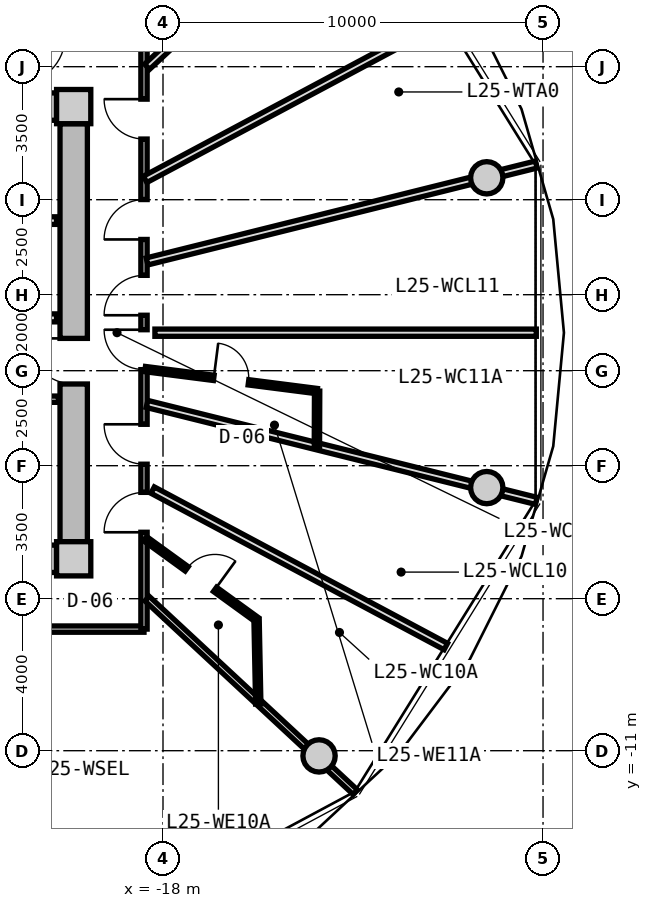
"""IFC4 building model, lengths in metres.
Left out: names, types, materials, properties, quantities, classifications, styles, units other than length and angle.
Written with IfcOpenShell. Run it as: python <this file> out.ifc"""

import sys

from ifc_helpers import new_model, si_unit, direction, frame, frame_2d, origin, origin_2d, place, context, subcontext, project, spatial, rectangle, circle, extrude, source, transform, mapped, element, fill, save


model = new_model("IFC4")
c1 = context("Model", 3, precision=1e-05, world=origin(), true_north=direction((0.0, 1.0)))
c2 = subcontext(c1, "Body", "Model", "MODEL_VIEW")
j1 = project(units=[si_unit("LENGTHUNIT", "METRE"), si_unit("PLANEANGLEUNIT", "RADIAN")], contexts=[c1])
p1 = place(None, origin())
s1 = spatial("IfcSite", under=j1, at=p1, CompositionType="ELEMENT")
p2 = place(p1, origin())
s2 = spatial("IfcBuilding", under=s1, at=p2, CompositionType="ELEMENT")
p3 = place(p2, frame((0.0, 0.0, 84.05)))
s3 = spatial("IfcBuildingStorey", under=s2, at=p3, CompositionType="ELEMENT", Elevation=84.05)
m1 = source(origin(), c2, "Body", "SweptSolid", [
    extrude(rectangle(XDim=0.9, YDim=0.9, at=origin_2d()), origin(), (0.0, 0.0, 1.0), 3.05),
])
for number, where, z_axis, x_axis in (
    (1, (-20.35, -5.95, 0.0), (0.0, 0.0, 1.0), (1.0, 0.0, 0.0)),
    (2, (-20.35, 5.95, 0.0), (0.0, 0.0, 1.0), (1.0, 0.0, 0.0)),
):
    element("IfcColumn", number, at=place(p3, frame(where, z_axis=z_axis, x_axis=x_axis)), inside=s3, PredefinedType="COLUMN", context=c2, shape_type="MappedRepresentation", body=[
        mapped(m1, transform((0.0, 0.0, 0.0), x_axis=(1.0, 0.0, 0.0), y_axis=(0.0, 1.0, 0.0), z_axis=(0.0, 0.0, 1.0), scale=1.0)),
    ])
m2 = source(origin(), c2, "Body", "SweptSolid", [
    extrude(rectangle(XDim=14.4, YDim=0.72, at=frame_2d((7.2, 0.0))), origin(), (0.0, 0.0, 1.0), 2.79),
])
for number, where, z_axis, x_axis in (
    (3, (-35.2, 5.95, 0.0), (0.0, 0.0, 1.0), (1.0, 0.0, 0.0)),
    (4, (-20.8, -5.95, 0.0), (0.0, 0.0, 1.0), (-1.0, 0.0, 0.0)),
):
    element("IfcWall", number, at=place(p3, frame(where, z_axis=z_axis, x_axis=x_axis)), inside=s3, PredefinedType="SHEAR", context=c2, shape_type="MappedRepresentation", body=[
        mapped(m2, transform((0.0, 0.0, 0.0), x_axis=(1.0, 0.0, 0.0), y_axis=(0.0, 1.0, 0.0), z_axis=(0.0, 0.0, 1.0), scale=1.0)),
    ])
m3 = source(origin(), c2, "Body", "SweptSolid", [
    extrude(rectangle(XDim=11.0, YDim=0.72, at=frame_2d((5.5, 0.0))), origin(), (0.0, 0.0, 1.0), 2.79),
])
p4 = place(p3, frame((-20.35, 5.5, 0.0), z_axis=(0.0, 0.0, 1.0), x_axis=(0.0, -1.0, 0.0)))
e5 = element("IfcWall", 5, at=p4, inside=s3, PredefinedType="SHEAR", context=c2, shape_type="MappedRepresentation", body=[
    mapped(m3, transform((0.0, 0.0, 0.0), x_axis=(1.0, 0.0, 0.0), y_axis=(0.0, 1.0, 0.0), z_axis=(0.0, 0.0, 1.0), scale=1.0)),
])
p5 = place(p4, frame((5.65, 0.0, 0.0)))
e6 = element("IfcOpeningElement", 6, at=p5, cuts=e5, PredefinedType="OPENING", context=c2, shape_type="SweptSolid", body=[
    extrude(rectangle(XDim=1.2, YDim=2.15, at=frame_2d((0.6, 1.075))), frame((0.0, 0.37, 0.0), z_axis=(0.0, -1.0, 0.0), x_axis=(1.0, 0.0, 0.0)), (0.0, 0.0, 1.0), 0.74),
])
m4 = source(origin(), c2, "Body", "SweptSolid", [
    extrude(circle(Radius=0.425, at=origin_2d()), origin(), (0.0, 0.0, 1.0), 3.05),
])
for number, where, z_axis, x_axis in (
    (7, (-9.481, 4.076, 0.0), (0.0, 0.0, 1.0), (1.0, 0.0, 0.0)),
    (8, (-13.894, -11.137, 0.0), (0.0, 0.0, 1.0), (1.0, 0.0, 0.0)),
    (9, (-9.481, -4.076, 0.0), (0.0, 0.0, 1.0), (1.0, 0.0, 0.0)),
):
    element("IfcColumn", number, at=place(p3, frame(where, z_axis=z_axis, x_axis=x_axis)), inside=s3, PredefinedType="COLUMN", context=c2, shape_type="MappedRepresentation", body=[
        mapped(m4, transform((0.0, 0.0, 0.0), x_axis=(1.0, 0.0, 0.0), y_axis=(0.0, 1.0, 0.0), z_axis=(0.0, 0.0, 1.0), scale=1.0)),
    ])
m5 = source(origin(), c2, "Body", "SweptSolid", [
    extrude(rectangle(XDim=3.2, YDim=0.2, at=frame_2d((1.6, 0.0))), origin(), (0.0, 0.0, 1.0), 2.775),
])
p6 = place(p3, frame((-24.0, 2.95, 0.0), z_axis=(0.0, 0.0, 1.0), x_axis=(1.0, 0.0, 0.0)))
e10 = element("IfcWall", 10, at=p6, inside=s3, PredefinedType="PARTITIONING", context=c2, shape_type="MappedRepresentation", body=[
    mapped(m5, transform((0.0, 0.0, 0.0), x_axis=(1.0, 0.0, 0.0), y_axis=(0.0, 1.0, 0.0), z_axis=(0.0, 0.0, 1.0), scale=1.0)),
])
m6 = source(origin(), c2, "Body", "SweptSolid", [
    extrude(rectangle(XDim=6.66, YDim=0.21, at=frame_2d((3.33, 0.0))), origin(), (0.0, 0.0, 1.0), 2.775),
])
p7 = place(p3, frame((-27.46, 0.39, 0.0), z_axis=(0.0, 0.0, 1.0), x_axis=(1.0, 0.0, 0.0)))
e11 = element("IfcWall", 11, at=p7, inside=s3, PredefinedType="PARTITIONING", context=c2, shape_type="MappedRepresentation", body=[
    mapped(m6, transform((0.0, 0.0, 0.0), x_axis=(1.0, 0.0, 0.0), y_axis=(0.0, 1.0, 0.0), z_axis=(0.0, 0.0, 1.0), scale=1.0)),
])
p8 = place(p7, frame((1.0, 0.0, 0.0)))
e12 = element("IfcOpeningElement", 12, at=p8, cuts=e11, PredefinedType="OPENING", context=c2, shape_type="SweptSolid", body=[
    extrude(rectangle(XDim=1.2, YDim=2.15, at=frame_2d((0.6, 1.075))), frame((0.0, 0.115, 0.0), z_axis=(0.0, -1.0, 0.0), x_axis=(1.0, 0.0, 0.0)), (0.0, 0.0, 1.0), 0.23),
])
m7 = source(origin(), c2, "Body", "SweptSolid", [
    extrude(rectangle(XDim=2.7, YDim=0.165, at=frame_2d((1.35, 0.0))), origin(), (0.0, 0.0, 1.0), 2.775),
])
p9 = place(p3, frame((-23.45, -1.75, 0.0), z_axis=(0.0, 0.0, 1.0), x_axis=(1.0, 0.0, 0.0)))
e13 = element("IfcWall", 13, at=p9, inside=s3, PredefinedType="PARTITIONING", context=c2, shape_type="MappedRepresentation", body=[
    mapped(m7, transform((0.0, 0.0, 0.0), x_axis=(1.0, 0.0, 0.0), y_axis=(0.0, 1.0, 0.0), z_axis=(0.0, 0.0, 1.0), scale=1.0)),
])
p10 = place(p9, frame((0.85, 0.0, 0.0)))
e14 = element("IfcOpeningElement", 14, at=p10, cuts=e13, PredefinedType="OPENING", context=c2, shape_type="SweptSolid", body=[
    extrude(rectangle(XDim=0.925, YDim=2.1, at=frame_2d((0.462, 1.05))), frame((0.0, 0.093, 0.0), z_axis=(0.0, -1.0, 0.0), x_axis=(1.0, 0.0, 0.0)), (0.0, 0.0, 1.0), 0.185),
])
m8 = source(origin(), c2, "Body", "SweptSolid", [
    extrude(rectangle(XDim=8.6, YDim=0.165, at=frame_2d((4.3, 0.0))), origin(), (0.0, 0.0, 1.0), 2.775),
])
p11 = place(p3, frame((-18.5, -7.8, 0.0), z_axis=(0.0, 0.0, 1.0), x_axis=(-1.0, 0.0, 0.0)))
e15 = element("IfcWall", 15, at=p11, inside=s3, PredefinedType="PARTITIONING", context=c2, shape_type="MappedRepresentation", body=[
    mapped(m8, transform((0.0, 0.0, 0.0), x_axis=(1.0, 0.0, 0.0), y_axis=(0.0, 1.0, 0.0), z_axis=(0.0, 0.0, 1.0), scale=1.0)),
])
p12 = place(p11, frame((3.775, 0.0, 0.0)))
e16 = element("IfcOpeningElement", 16, at=p12, cuts=e15, PredefinedType="OPENING", context=c2, shape_type="SweptSolid", body=[
    extrude(rectangle(XDim=1.05, YDim=2.15, at=frame_2d((0.525, 1.075))), frame((0.0, 0.093, 0.0), z_axis=(0.0, -1.0, 0.0), x_axis=(1.0, 0.0, 0.0)), (0.0, 0.0, 1.0), 0.185),
])
m9 = source(origin(), c2, "Body", "SweptSolid", [
    extrude(rectangle(XDim=15.6, YDim=0.165, at=frame_2d((7.8, 0.0))), origin(), (0.0, 0.0, 1.0), 2.775),
])
p13 = place(p3, frame((-18.5, 7.8, 0.0), z_axis=(0.0, 0.0, 1.0), x_axis=(0.0, -1.0, 0.0)))
e17 = element("IfcWall", 17, at=p13, inside=s3, PredefinedType="PARTITIONING", context=c2, shape_type="MappedRepresentation", body=[
    mapped(m9, transform((0.0, 0.0, 0.0), x_axis=(1.0, 0.0, 0.0), y_axis=(0.0, 1.0, 0.0), z_axis=(0.0, 0.0, 1.0), scale=1.0)),
])
p14 = place(p13, frame((12.002, 0.0, 0.0)))
e18 = element("IfcOpeningElement", 18, at=p14, cuts=e17, PredefinedType="OPENING", context=c2, shape_type="SweptSolid", body=[
    extrude(rectangle(XDim=1.05, YDim=2.15, at=frame_2d((0.525, 1.075))), frame((0.0, 0.093, 0.0), z_axis=(0.0, -1.0, 0.0), x_axis=(1.0, 0.0, 0.0)), (0.0, 0.0, 1.0), 0.185),
])
p15 = place(p13, frame((10.211, 0.0, 0.0)))
e19 = element("IfcOpeningElement", 19, at=p15, cuts=e17, PredefinedType="OPENING", context=c2, shape_type="SweptSolid", body=[
    extrude(rectangle(XDim=1.05, YDim=2.15, at=frame_2d((0.525, 1.075))), frame((0.0, 0.093, 0.0), z_axis=(0.0, -1.0, 0.0), x_axis=(1.0, 0.0, 0.0)), (0.0, 0.0, 1.0), 0.185),
])
p16 = place(p13, frame((7.722, 0.0, 0.0)))
e20 = element("IfcOpeningElement", 20, at=p16, cuts=e17, PredefinedType="OPENING", context=c2, shape_type="SweptSolid", body=[
    extrude(rectangle(XDim=1.05, YDim=2.15, at=frame_2d((0.525, 1.075))), frame((0.0, 0.093, 0.0), z_axis=(0.0, -1.0, 0.0), x_axis=(1.0, 0.0, 0.0)), (0.0, 0.0, 1.0), 0.185),
])
p17 = place(p13, frame((6.291, 0.0, 0.0)))
e21 = element("IfcOpeningElement", 21, at=p17, cuts=e17, PredefinedType="OPENING", context=c2, shape_type="SweptSolid", body=[
    extrude(rectangle(XDim=1.05, YDim=2.15, at=frame_2d((0.525, 1.075))), frame((0.0, 0.093, 0.0), z_axis=(0.0, -1.0, 0.0), x_axis=(1.0, 0.0, 0.0)), (0.0, 0.0, 1.0), 0.185),
])
p18 = place(p13, frame((4.296, 0.0, 0.0)))
e22 = element("IfcOpeningElement", 22, at=p18, cuts=e17, PredefinedType="OPENING", context=c2, shape_type="SweptSolid", body=[
    extrude(rectangle(XDim=1.05, YDim=2.15, at=frame_2d((0.525, 1.075))), frame((0.0, 0.093, 0.0), z_axis=(0.0, -1.0, 0.0), x_axis=(1.0, 0.0, 0.0)), (0.0, 0.0, 1.0), 0.185),
])
p19 = place(p13, frame((1.654, 0.0, 0.0)))
e23 = element("IfcOpeningElement", 23, at=p19, cuts=e17, PredefinedType="OPENING", context=c2, shape_type="SweptSolid", body=[
    extrude(rectangle(XDim=1.05, YDim=2.15, at=frame_2d((0.525, 1.075))), frame((0.0, 0.093, 0.0), z_axis=(0.0, -1.0, 0.0), x_axis=(1.0, 0.0, 0.0)), (0.0, 0.0, 1.0), 0.185),
])
m10 = source(origin(), c2, "Body", "SweptSolid", [
    extrude(rectangle(XDim=7.482, YDim=0.165, at=frame_2d((3.741, 0.0))), origin(), (0.0, 0.0, 1.0), 2.275),
])
p20 = place(p3, frame((-18.42, -6.998, 0.0), z_axis=(0.0, 0.0, 1.0), x_axis=(0.732508698043, -0.680757671489, 0.0)))
e24 = element("IfcWall", 24, at=p20, inside=s3, PredefinedType="PARTITIONING", context=c2, shape_type="MappedRepresentation", body=[
    mapped(m10, transform((0.0, 0.0, 0.0), x_axis=(1.0, 0.0, 0.0), y_axis=(0.0, 1.0, 0.0), z_axis=(0.0, 0.0, 1.0), scale=1.0)),
])
m11 = source(origin(), c2, "Body", "SweptSolid", [
    extrude(rectangle(XDim=10.556, YDim=0.19, at=frame_2d((5.278, 0.0))), origin(), (0.0, 0.0, 1.0), 2.275),
])
p21 = place(p3, frame((-18.42, -1.875, 0.0), z_axis=(0.0, 0.0, 1.0), x_axis=(0.970363857851, -0.241648470667, 0.0)))
e25 = element("IfcWall", 25, at=p21, inside=s3, PredefinedType="PARTITIONING", context=c2, shape_type="MappedRepresentation", body=[
    mapped(m11, transform((0.0, 0.0, 0.0), x_axis=(1.0, 0.0, 0.0), y_axis=(0.0, 1.0, 0.0), z_axis=(0.0, 0.0, 1.0), scale=1.0)),
])
m12 = source(origin(), c2, "Body", "SweptSolid", [
    extrude(rectangle(XDim=8.744, YDim=0.19, at=frame_2d((4.372, 0.0))), origin(), (0.0, 0.0, 1.0), 2.775),
])
p22 = place(p3, frame((-18.273, -4.142, 0.0), z_axis=(0.0, 0.0, 1.0), x_axis=(0.882252449936, -0.470776607938, 0.0)))
e26 = element("IfcWall", 26, at=p22, inside=s3, PredefinedType="PARTITIONING", context=c2, shape_type="MappedRepresentation", body=[
    mapped(m12, transform((0.0, 0.0, 0.0), x_axis=(1.0, 0.0, 0.0), y_axis=(0.0, 1.0, 0.0), z_axis=(0.0, 0.0, 1.0), scale=1.0)),
])
m13 = source(origin(), c2, "Body", "SweptSolid", [
    extrude(rectangle(XDim=3.621, YDim=0.14, at=frame_2d((1.811, 0.0))), origin(), (0.0, 0.0, 1.0), 2.775),
])
p23 = place(p3, frame((-18.47, -5.422, 0.0), z_axis=(0.0, 0.0, 1.0), x_axis=(0.80968252222, -0.586868139544, 0.0)))
e27 = element("IfcWall", 27, at=p23, inside=s3, PredefinedType="PARTITIONING", context=c2, shape_type="MappedRepresentation", body=[
    mapped(m13, transform((0.0, 0.0, 0.0), x_axis=(1.0, 0.0, 0.0), y_axis=(0.0, 1.0, 0.0), z_axis=(0.0, 0.0, 1.0), scale=1.0)),
])
p24 = place(p23, frame((1.351, 0.0, 0.0)))
e28 = element("IfcOpeningElement", 28, at=p24, cuts=e27, PredefinedType="OPENING", context=c2, shape_type="SweptSolid", body=[
    extrude(rectangle(XDim=0.92, YDim=2.1, at=frame_2d((0.46, 1.05))), frame((0.0, 0.08, 0.0), z_axis=(0.0, -1.0, 0.0), x_axis=(1.0, 0.0, 0.0)), (0.0, 0.0, 1.0), 0.16),
])
m14 = source(origin(), c2, "Body", "SweptSolid", [
    extrude(rectangle(XDim=2.225, YDim=0.14, at=frame_2d((1.112, 0.0))), origin(), (0.0, 0.0, 1.0), 2.775),
])
p25 = place(p3, frame((-15.538, -7.547, 0.0), z_axis=(0.0, 0.0, 1.0), x_axis=(0.019971869027, -0.999800542332, 0.0)))
e29 = element("IfcWall", 29, at=p25, inside=s3, PredefinedType="PARTITIONING", context=c2, shape_type="MappedRepresentation", body=[
    mapped(m14, transform((0.0, 0.0, 0.0), x_axis=(1.0, 0.0, 0.0), y_axis=(0.0, 1.0, 0.0), z_axis=(0.0, 0.0, 1.0), scale=1.0)),
])
p26 = place(p3, frame((-18.42, 1.875, 0.0), z_axis=(0.0, 0.0, 1.0), x_axis=(0.970363857851, 0.241648470667, 0.0)))
e30 = element("IfcWall", 30, at=p26, inside=s3, PredefinedType="PARTITIONING", context=c2, shape_type="MappedRepresentation", body=[
    mapped(m11, transform((0.0, 0.0, 0.0), x_axis=(1.0, 0.0, 0.0), y_axis=(0.0, 1.0, 0.0), z_axis=(0.0, 0.0, 1.0), scale=1.0)),
])
m15 = source(origin(), c2, "Body", "SweptSolid", [
    extrude(rectangle(XDim=10.036, YDim=0.19, at=frame_2d((5.018, 0.0))), origin(), (0.0, 0.0, 1.0), 2.775),
])
p27 = place(p3, frame((-18.213, 0.0, 0.0), z_axis=(0.0, 0.0, 1.0), x_axis=(1.0, 0.0, 0.0)))
e31 = element("IfcWall", 31, at=p27, inside=s3, PredefinedType="PARTITIONING", context=c2, shape_type="MappedRepresentation", body=[
    mapped(m15, transform((0.0, 0.0, 0.0), x_axis=(1.0, 0.0, 0.0), y_axis=(0.0, 1.0, 0.0), z_axis=(0.0, 0.0, 1.0), scale=1.0)),
])
m16 = source(origin(), c2, "Body", "SweptSolid", [
    extrude(rectangle(XDim=4.562, YDim=0.14, at=frame_2d((2.281, 0.0))), origin(), (0.0, 0.0, 1.0), 2.775),
])
p28 = place(p3, frame((-18.47, -0.958, 0.0), z_axis=(0.0, 0.0, 1.0), x_axis=(0.991904666356, -0.126984774129, 0.0)))
e32 = element("IfcWall", 32, at=p28, inside=s3, PredefinedType="PARTITIONING", context=c2, shape_type="MappedRepresentation", body=[
    mapped(m16, transform((0.0, 0.0, 0.0), x_axis=(1.0, 0.0, 0.0), y_axis=(0.0, 1.0, 0.0), z_axis=(0.0, 0.0, 1.0), scale=1.0)),
])
p29 = place(p28, frame((1.821, 0.0, 0.0)))
e33 = element("IfcOpeningElement", 33, at=p29, cuts=e32, PredefinedType="OPENING", context=c2, shape_type="SweptSolid", body=[
    extrude(rectangle(XDim=0.92, YDim=2.1, at=frame_2d((0.46, 1.05))), frame((0.0, 0.08, 0.0), z_axis=(0.0, -1.0, 0.0), x_axis=(1.0, 0.0, 0.0)), (0.0, 0.0, 1.0), 0.16),
])
m17 = source(origin(), c2, "Body", "SweptSolid", [
    extrude(rectangle(XDim=1.468, YDim=0.14, at=frame_2d((0.734, 0.0))), origin(), (0.0, 0.0, 1.0), 2.775),
])
p30 = place(p3, frame((-13.945, -1.537, 0.0), z_axis=(0.0, 0.0, 1.0), x_axis=(-0.00399198416, -0.999992031999, 0.0)))
e34 = element("IfcWall", 34, at=p30, inside=s3, PredefinedType="PARTITIONING", context=c2, shape_type="MappedRepresentation", body=[
    mapped(m17, transform((0.0, 0.0, 0.0), x_axis=(1.0, 0.0, 0.0), y_axis=(0.0, 1.0, 0.0), z_axis=(0.0, 0.0, 1.0), scale=1.0)),
])
m18 = source(origin(), c2, "Body", "SweptSolid", [
    extrude(rectangle(XDim=7.482, YDim=0.19, at=frame_2d((3.741, 0.0))), origin(), (0.0, 0.0, 1.0), 2.275),
])
p31 = place(p3, frame((-18.42, 6.998, 0.0), z_axis=(0.0, 0.0, 1.0), x_axis=(0.732508698043, 0.680757671489, 0.0)))
e35 = element("IfcWall", 35, at=p31, inside=s3, PredefinedType="PARTITIONING", context=c2, shape_type="MappedRepresentation", body=[
    mapped(m18, transform((0.0, 0.0, 0.0), x_axis=(1.0, 0.0, 0.0), y_axis=(0.0, 1.0, 0.0), z_axis=(0.0, 0.0, 1.0), scale=1.0)),
])
m19 = source(origin(), c2, "Body", "SweptSolid", [
    extrude(rectangle(XDim=8.968, YDim=0.19, at=frame_2d((4.484, 0.0))), origin(), (0.0, 0.0, 1.0), 2.775),
])
p32 = place(p3, frame((-18.47, 4.036, 0.0), z_axis=(0.0, 0.0, 1.0), x_axis=(0.882202936563, 0.47086938605, 0.0)))
e36 = element("IfcWall", 36, at=p32, inside=s3, PredefinedType="PARTITIONING", context=c2, shape_type="MappedRepresentation", body=[
    mapped(m19, transform((0.0, 0.0, 0.0), x_axis=(1.0, 0.0, 0.0), y_axis=(0.0, 1.0, 0.0), z_axis=(0.0, 0.0, 1.0), scale=1.0)),
])
m20 = source(origin(), c2, "Body", "SweptSolid", [
    extrude(rectangle(XDim=1.2, YDim=2.15, at=frame_2d((0.6, 1.075))), frame((0.0, 0.025, 0.0), z_axis=(0.0, -1.0, 0.0), x_axis=(1.0, 0.0, 0.0)), (0.0, 0.0, 1.0), 0.05),
])
p33 = place(p5, frame((1.2, 0.0, 0.0), z_axis=(0.0, 0.0, 1.0), x_axis=(-1.0, 0.0, 0.0)))
e37 = element("IfcDoor", 37, at=p33, inside=s3, OperationType="SINGLE_SWING_RIGHT", PredefinedType="DOOR", context=c2, shape_type="MappedRepresentation", body=[
    mapped(m20, transform((0.0, 0.0, 0.0), x_axis=(1.0, 0.0, 0.0), y_axis=(0.0, 1.0, 0.0), z_axis=(0.0, 0.0, 1.0), scale=1.0)),
])
fill(e6, e37)
m21 = source(origin(), c2, "Body", "SweptSolid", [
    extrude(rectangle(XDim=1.05, YDim=2.15, at=frame_2d((0.525, 1.075))), frame((0.0, 0.025, 0.0), z_axis=(0.0, -1.0, 0.0), x_axis=(1.0, 0.0, 0.0)), (0.0, 0.0, 1.0), 0.05),
])
p34 = place(p14, frame((1.05, 0.0, 0.0), z_axis=(0.0, 0.0, 1.0), x_axis=(-1.0, 0.0, 0.0)))
e38 = element("IfcDoor", 38, at=p34, inside=s3, OperationType="SINGLE_SWING_LEFT", PredefinedType="DOOR", context=c2, shape_type="MappedRepresentation", body=[
    mapped(m21, transform((0.0, 0.0, 0.0), x_axis=(1.0, 0.0, 0.0), y_axis=(0.0, 1.0, 0.0), z_axis=(0.0, 0.0, 1.0), scale=1.0)),
])
fill(e18, e38)
m22 = source(origin(), c2, "Body", "SweptSolid", [
    extrude(rectangle(XDim=0.92, YDim=2.1, at=frame_2d((0.46, 1.05))), frame((0.0, 0.025, 0.0), z_axis=(0.0, -1.0, 0.0), x_axis=(1.0, 0.0, 0.0)), (0.0, 0.0, 1.0), 0.05),
])
p35 = place(p24, origin())
e39 = element("IfcDoor", 39, at=p35, inside=s3, OperationType="SINGLE_SWING_RIGHT", PredefinedType="DOOR", context=c2, shape_type="MappedRepresentation", body=[
    mapped(m22, transform((0.0, 0.0, 0.0), x_axis=(1.0, 0.0, 0.0), y_axis=(0.0, 1.0, 0.0), z_axis=(0.0, 0.0, 1.0), scale=1.0)),
])
fill(e28, e39)
p36 = place(p15, frame((1.05, 0.0, 0.0), z_axis=(0.0, 0.0, 1.0), x_axis=(-1.0, 0.0, 0.0)))
e40 = element("IfcDoor", 40, at=p36, inside=s3, OperationType="SINGLE_SWING_RIGHT", PredefinedType="DOOR", context=c2, shape_type="MappedRepresentation", body=[
    mapped(m21, transform((0.0, 0.0, 0.0), x_axis=(1.0, 0.0, 0.0), y_axis=(0.0, 1.0, 0.0), z_axis=(0.0, 0.0, 1.0), scale=1.0)),
])
fill(e19, e40)
p37 = place(p16, frame((1.05, 0.0, 0.0), z_axis=(0.0, 0.0, 1.0), x_axis=(-1.0, 0.0, 0.0)))
e41 = element("IfcDoor", 41, at=p37, inside=s3, OperationType="SINGLE_SWING_RIGHT", PredefinedType="DOOR", context=c2, shape_type="MappedRepresentation", body=[
    mapped(m21, transform((0.0, 0.0, 0.0), x_axis=(1.0, 0.0, 0.0), y_axis=(0.0, 1.0, 0.0), z_axis=(0.0, 0.0, 1.0), scale=1.0)),
])
fill(e20, e41)
p38 = place(p29, origin())
e42 = element("IfcDoor", 42, at=p38, inside=s3, OperationType="SINGLE_SWING_LEFT", PredefinedType="DOOR", context=c2, shape_type="MappedRepresentation", body=[
    mapped(m22, transform((0.0, 0.0, 0.0), x_axis=(1.0, 0.0, 0.0), y_axis=(0.0, 1.0, 0.0), z_axis=(0.0, 0.0, 1.0), scale=1.0)),
])
fill(e33, e42)
p39 = place(p17, frame((1.05, 0.0, 0.0), z_axis=(0.0, 0.0, 1.0), x_axis=(-1.0, 0.0, 0.0)))
e43 = element("IfcDoor", 43, at=p39, inside=s3, OperationType="SINGLE_SWING_LEFT", PredefinedType="DOOR", context=c2, shape_type="MappedRepresentation", body=[
    mapped(m21, transform((0.0, 0.0, 0.0), x_axis=(1.0, 0.0, 0.0), y_axis=(0.0, 1.0, 0.0), z_axis=(0.0, 0.0, 1.0), scale=1.0)),
])
fill(e21, e43)
p40 = place(p18, frame((1.05, 0.0, 0.0), z_axis=(0.0, 0.0, 1.0), x_axis=(-1.0, 0.0, 0.0)))
e44 = element("IfcDoor", 44, at=p40, inside=s3, OperationType="SINGLE_SWING_LEFT", PredefinedType="DOOR", context=c2, shape_type="MappedRepresentation", body=[
    mapped(m21, transform((0.0, 0.0, 0.0), x_axis=(1.0, 0.0, 0.0), y_axis=(0.0, 1.0, 0.0), z_axis=(0.0, 0.0, 1.0), scale=1.0)),
])
fill(e22, e44)
p41 = place(p19, frame((1.05, 0.0, 0.0), z_axis=(0.0, 0.0, 1.0), x_axis=(-1.0, 0.0, 0.0)))
e45 = element("IfcDoor", 45, at=p41, inside=s3, OperationType="SINGLE_SWING_RIGHT", PredefinedType="DOOR", context=c2, shape_type="MappedRepresentation", body=[
    mapped(m21, transform((0.0, 0.0, 0.0), x_axis=(1.0, 0.0, 0.0), y_axis=(0.0, 1.0, 0.0), z_axis=(0.0, 0.0, 1.0), scale=1.0)),
])
fill(e23, e45)
save(model, sys.argv[1])
